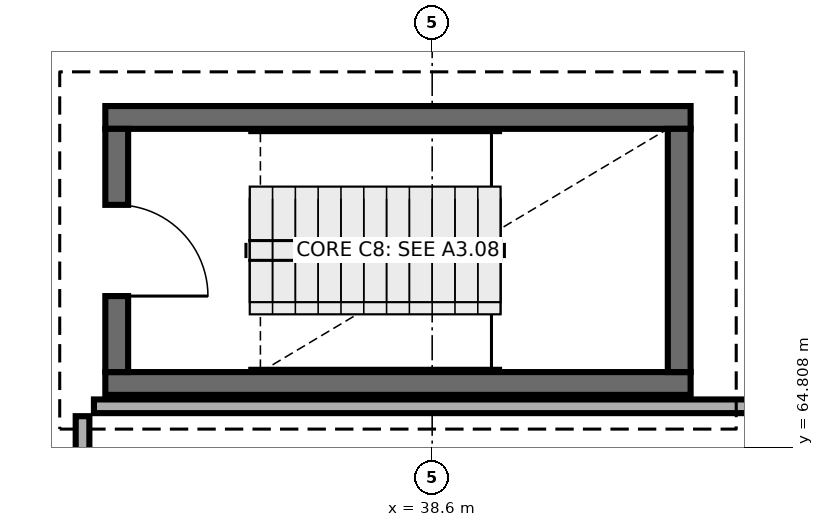
"""IFC4 building model, lengths in metres.
Left out: names, types, materials, properties, quantities, classifications, styles, units other than length and angle.
Written with IfcOpenShell. Run it as: python <this file> out.ifc"""

import sys

from ifc_helpers import new_model, si_unit, direction, frame, frame_2d, origin, place, context, subcontext, project, spatial, rectangle, extrude, element, fill, save


model = new_model("IFC4")
c1 = context("Model", 3, precision=1e-05, world=origin(), true_north=direction((0.0, 1.0)))
c2 = subcontext(c1, "Body", "Model", "MODEL_VIEW")
j1 = project(units=[si_unit("LENGTHUNIT", "METRE"), si_unit("PLANEANGLEUNIT", "RADIAN")], contexts=[c1])
p1 = place(None, origin())
s1 = spatial("IfcSite", under=j1, at=p1, CompositionType="ELEMENT")
p2 = place(p1, origin())
s2 = spatial("IfcBuilding", under=s1, at=p2, CompositionType="ELEMENT")
p3 = place(p2, frame((0.0, 0.0, 4.8)))
s3 = spatial("IfcBuildingStorey", under=s2, at=p3, CompositionType="ELEMENT", Elevation=4.8)
for number, where, z_axis, x_axis in (
    (1, (34.3, 65.65, 0.0), (0.0, 0.0, 1.0), (1.0, 0.0, 0.0)),
    (2, (42.0, 69.15, 0.0), (0.0, 0.0, 1.0), (-1.0, 0.0, 0.0)),
):
    element("IfcWall", number, at=place(p3, frame(where, z_axis=z_axis, x_axis=x_axis)), inside=s3, PredefinedType="SHEAR", context=c2, shape_type="SweptSolid", body=[
        extrude(rectangle(XDim=7.7, YDim=0.3, at=frame_2d((3.85, 0.0))), origin(), (0.0, 0.0, 1.0), 4.5),
    ])
p4 = place(p3, frame((34.45, 69.0, 0.0), z_axis=(0.0, 0.0, 1.0), x_axis=(0.0, -1.0, 0.0)))
e3 = element("IfcWall", 3, at=p4, inside=s3, PredefinedType="SHEAR", context=c2, shape_type="SweptSolid", body=[
    extrude(rectangle(XDim=3.2, YDim=0.3, at=frame_2d((1.6, 0.0))), origin(), (0.0, 0.0, 1.0), 4.5),
])
p5 = place(p4, frame((1.0, 0.0, 0.0)))
e4 = element("IfcOpeningElement", 4, at=p5, cuts=e3, PredefinedType="OPENING", context=c2, shape_type="SweptSolid", body=[
    extrude(rectangle(XDim=1.2, YDim=2.15, at=frame_2d((0.6, 1.075))), frame((0.0, 0.16, 0.0), z_axis=(0.0, -1.0, 0.0), x_axis=(1.0, 0.0, 0.0)), (0.0, 0.0, 1.0), 0.32),
])
p6 = place(p3, frame((41.85, 65.8, 0.0), z_axis=(0.0, 0.0, 1.0), x_axis=(0.0, 1.0, 0.0)))
e5 = element("IfcWall", 5, at=p6, inside=s3, PredefinedType="SHEAR", context=c2, shape_type="SweptSolid", body=[
    extrude(rectangle(XDim=3.2, YDim=0.3, at=frame_2d((1.6, 0.0))), origin(), (0.0, 0.0, 1.0), 4.5),
])
p7 = place(p3, frame((34.15, 65.35, 0.0), z_axis=(0.0, 0.0, 1.0), x_axis=(1.0, 0.0, 0.0)))
e6 = element("IfcWall", 6, at=p7, inside=s3, PredefinedType="PARTITIONING", context=c2, shape_type="SweptSolid", body=[
    extrude(rectangle(XDim=12.965, YDim=0.18, at=frame_2d((6.482, 0.0))), origin(), (0.0, 0.0, 1.0), 4.25),
])
p8 = place(p3, frame((34.0, 61.75, 0.0), z_axis=(0.0, 0.0, 1.0), x_axis=(0.0, 1.0, 0.0)))
e7 = element("IfcWall", 7, at=p8, inside=s3, PredefinedType="PARTITIONING", context=c2, shape_type="SweptSolid", body=[
    extrude(rectangle(XDim=3.47, YDim=0.18, at=frame_2d((1.735, 0.0))), origin(), (0.0, 0.0, 1.0), 4.25),
])
p9 = place(p8, frame((1.285, 0.0, 0.0)))
e8 = element("IfcOpeningElement", 8, at=p9, cuts=e7, PredefinedType="OPENING", context=c2, shape_type="SweptSolid", body=[
    extrude(rectangle(XDim=0.9, YDim=2.1, at=frame_2d((0.45, 1.05))), frame((0.0, 0.1, 0.0), z_axis=(0.0, -1.0, 0.0), x_axis=(1.0, 0.0, 0.0)), (0.0, 0.0, 1.0), 0.2),
])
p10 = place(p5, origin())
e9 = element("IfcDoor", 9, at=p10, inside=s3, OperationType="SINGLE_SWING_RIGHT", PredefinedType="DOOR", context=c2, shape_type="SweptSolid", body=[
    extrude(rectangle(XDim=1.2, YDim=2.15, at=frame_2d((0.6, 1.075))), frame((0.0, 0.025, 0.0), z_axis=(0.0, -1.0, 0.0), x_axis=(1.0, 0.0, 0.0)), (0.0, 0.0, 1.0), 0.05),
])
fill(e4, e9)
save(model, sys.argv[1])
